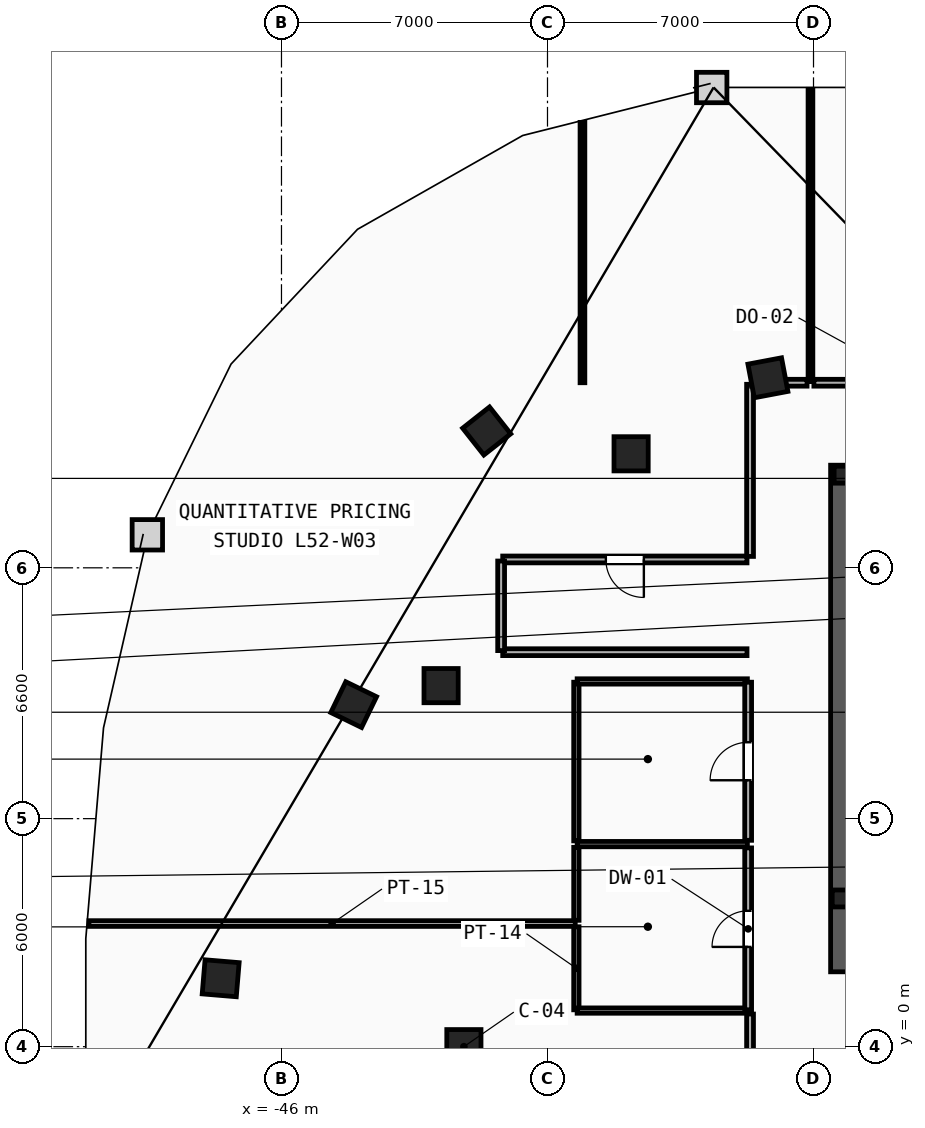
"""IFC4 building model, lengths in metres.
Left out: names, types, materials, properties, quantities, classifications, styles, units other than length and angle.
Written with IfcOpenShell. Run it as: python <this file> out.ifc"""

import sys

from ifc_helpers import new_model, si_unit, direction, frame, frame_2d, origin, origin_2d, place, context, subcontext, project, spatial, rectangle, i_section, extrude, element, fill, save


model = new_model("IFC4")
c1 = context("Model", 3, precision=1e-05, world=origin(), true_north=direction((0.0, 1.0)))
c2 = subcontext(c1, "Body", "Model", "MODEL_VIEW")
j1 = project(units=[si_unit("LENGTHUNIT", "METRE"), si_unit("PLANEANGLEUNIT", "RADIAN")], contexts=[c1])
p1 = place(None, origin())
s1 = spatial("IfcSite", under=j1, at=p1, CompositionType="ELEMENT")
p2 = place(p1, origin())
s2 = spatial("IfcBuilding", under=s1, at=p2, CompositionType="ELEMENT")
p3 = place(p2, frame((0.0, 0.0, 199.0)))
s3 = spatial("IfcBuildingStorey", under=s2, at=p3, CompositionType="ELEMENT", Elevation=199.0)
for number, where, z_axis, x_axis in (
    (1, (-31.3, 3.9, 0.0), (0.0, 0.0, 1.0), (1.0, 0.0, 0.0)),
    (2, (-31.25, 15.05, 0.0), (0.0, 0.0, 1.0), (1.0, 0.0, 0.0)),
):
    element("IfcColumn", number, at=place(p3, frame(where, z_axis=z_axis, x_axis=x_axis)), inside=s3, PredefinedType="COLUMN", context=c2, shape_type="SweptSolid", body=[
        extrude(i_section(OverallWidth=0.416, OverallDepth=0.446, WebThickness=0.039, FlangeThickness=0.063, FilletRadius=0.018, at=origin_2d()), origin(), (0.0, 0.0, 1.0), 3.6),
    ])
for number, where, z_axis, x_axis in (
    (3, (-41.2, 0.0, 0.0), (0.0, 0.0, 1.0), (1.0, 0.0, 0.0)),
    (4, (-41.8, 9.5, 0.0), (0.0, 0.0, 1.0), (1.0, 0.0, 0.0)),
    (5, (-36.8, 15.6, 0.0), (0.0, 0.0, 1.0), (1.0, 0.0, 0.0)),
    (6, (-33.2, 17.6, 0.0), (0.0, 0.0, 1.0), (-0.983, -0.186, 0.0)),
    (7, (-40.6, 16.2, 0.0), (0.0, 0.0, 1.0), (-0.785, -0.619, 0.0)),
    (8, (-44.1, 9.0, 0.0), (0.0, 0.0, 1.0), (-0.437, -0.899, 0.0)),
    (9, (-47.6, 1.8, 0.0), (0.0, 0.0, 1.0), (-0.084, -0.997, 0.0)),
):
    element("IfcColumn", number, at=place(p3, frame(where, z_axis=z_axis, x_axis=x_axis)), inside=s3, PredefinedType="COLUMN", context=c2, shape_type="SweptSolid", body=[
        extrude(rectangle(XDim=0.9, YDim=0.9, at=origin_2d()), origin(), (0.0, 0.0, 1.0), 3.6),
    ])
p4 = place(p3, frame((-31.225, 1.97, 0.0), z_axis=(0.0, 0.0, 1.0), x_axis=(0.0, 1.0, 0.0)))
e10 = element("IfcWall", 10, at=p4, inside=s3, PredefinedType="SHEAR", context=c2, shape_type="SweptSolid", body=[
    extrude(rectangle(XDim=13.33, YDim=0.65, at=frame_2d((6.665, 0.0))), origin(), (0.0, 0.0, 1.0), 3.34),
])
p5 = place(p3, frame((-31.2, 15.1, 0.0), z_axis=(0.0, 0.0, 1.0), x_axis=(1.0, 0.0, 0.0)))
e11 = element("IfcWall", 11, at=p5, inside=s3, PredefinedType="SHEAR", context=c2, shape_type="SweptSolid", body=[
    extrude(rectangle(XDim=2.5, YDim=0.3, at=frame_2d((1.25, 0.0))), origin(), (0.0, 0.0, 1.0), 3.34),
])
p6 = place(p3, frame((-38.24, 0.97, 0.0), z_axis=(0.0, 0.0, 1.0), x_axis=(0.0, 1.0, 0.0)))
e12 = element("IfcWall", 12, at=p6, inside=s3, PredefinedType="PARTITIONING", context=c2, shape_type="SweptSolid", body=[
    extrude(rectangle(XDim=2.185, YDim=0.14, at=frame_2d((1.093, 0.0))), origin(), (0.0, 0.0, 1.0), 3.34),
])
p7 = place(p3, frame((-38.24, 3.325, 0.0), z_axis=(0.0, 0.0, 1.0), x_axis=(0.0, 1.0, 0.0)))
e13 = element("IfcWall", 13, at=p7, inside=s3, PredefinedType="PARTITIONING", context=c2, shape_type="SweptSolid", body=[
    extrude(rectangle(XDim=1.92, YDim=0.14, at=frame_2d((0.96, 0.0))), origin(), (0.0, 0.0, 1.0), 3.34),
])
p8 = place(p3, frame((-38.24, 5.415, 0.0), z_axis=(0.0, 0.0, 1.0), x_axis=(0.0, 1.0, 0.0)))
e14 = element("IfcWall", 14, at=p8, inside=s3, PredefinedType="PARTITIONING", context=c2, shape_type="SweptSolid", body=[
    extrude(rectangle(XDim=4.175, YDim=0.14, at=frame_2d((2.087, 0.0))), origin(), (0.0, 0.0, 1.0), 3.34),
])
for number, where, z_axis, x_axis in (
    (15, (-38.22, 0.95, 0.0), (0.0, 0.0, 1.0), (1.0, 0.0, 0.0)),
    (16, (-38.22, 5.33, 0.0), (0.0, 0.0, 1.0), (1.0, 0.0, 0.0)),
    (17, (-38.22, 9.61, 0.0), (0.0, 0.0, 1.0), (1.0, 0.0, 0.0)),
):
    element("IfcWall", number, at=place(p3, frame(where, z_axis=z_axis, x_axis=x_axis)), inside=s3, PredefinedType="PARTITIONING", context=c2, shape_type="SweptSolid", body=[
        extrude(rectangle(XDim=4.48, YDim=0.14, at=frame_2d((2.24, 0.0))), origin(), (0.0, 0.0, 1.0), 3.34),
    ])
p9 = place(p3, frame((-33.72, 0.97, 0.0), z_axis=(0.0, 0.0, 1.0), x_axis=(0.0, 1.0, 0.0)))
e18 = element("IfcWall", 18, at=p9, inside=s3, PredefinedType="PARTITIONING", context=c2, shape_type="SweptSolid", body=[
    extrude(rectangle(XDim=4.26, YDim=0.18, at=frame_2d((2.13, 0.0))), origin(), (0.0, 0.0, 1.0), 3.34),
])
p10 = place(p9, frame((1.655, 0.0, 0.0)))
e19 = element("IfcOpeningElement", 19, at=p10, cuts=e18, PredefinedType="OPENING", context=c2, shape_type="SweptSolid", body=[
    extrude(rectangle(XDim=0.95, YDim=2.1, at=frame_2d((0.475, 1.05))), frame((0.0, 0.1, 0.0), z_axis=(0.0, -1.0, 0.0), x_axis=(1.0, 0.0, 0.0)), (0.0, 0.0, 1.0), 0.2),
])
p11 = place(p3, frame((-33.72, 5.43, 0.0), z_axis=(0.0, 0.0, 1.0), x_axis=(0.0, 1.0, 0.0)))
e20 = element("IfcWall", 20, at=p11, inside=s3, PredefinedType="PARTITIONING", context=c2, shape_type="SweptSolid", body=[
    extrude(rectangle(XDim=4.16, YDim=0.18, at=frame_2d((2.08, 0.0))), origin(), (0.0, 0.0, 1.0), 3.34),
])
p12 = place(p11, frame((1.58, 0.0, 0.0)))
e21 = element("IfcOpeningElement", 21, at=p12, cuts=e20, PredefinedType="OPENING", context=c2, shape_type="SweptSolid", body=[
    extrude(rectangle(XDim=1.0, YDim=2.15, at=frame_2d((0.5, 1.075))), frame((0.0, 0.1, 0.0), z_axis=(0.0, -1.0, 0.0), x_axis=(1.0, 0.0, 0.0)), (0.0, 0.0, 1.0), 0.2),
])
p13 = place(p3, frame((-51.066, 3.24, 0.0), z_axis=(0.0, 0.0, 1.0), x_axis=(1.0, 0.0, 0.0)))
e22 = element("IfcWall", 22, at=p13, inside=s3, PredefinedType="PARTITIONING", context=c2, shape_type="SweptSolid", body=[
    extrude(rectangle(XDim=12.796, YDim=0.15, at=frame_2d((6.398, 0.0))), origin(), (0.0, 0.0, 1.0), 3.34),
])
p14 = place(p3, frame((-38.08, 17.47, 0.0), z_axis=(0.0, 0.0, 1.0), x_axis=(0.0, 1.0, 0.0)))
e23 = element("IfcWall", 23, at=p14, inside=s3, PredefinedType="PARTITIONING", context=c2, shape_type="SweptSolid", body=[
    extrude(rectangle(XDim=6.85, YDim=0.125, at=frame_2d((3.425, 0.0))), origin(), (0.0, 0.0, 1.0), 3.34),
])
p15 = place(p3, frame((-32.08, 17.5, 0.0), z_axis=(0.0, 0.0, 1.0), x_axis=(0.0, 1.0, 0.0)))
e24 = element("IfcWall", 24, at=p15, inside=s3, PredefinedType="PARTITIONING", context=c2, shape_type="SweptSolid", body=[
    extrude(rectangle(XDim=7.69, YDim=0.125, at=frame_2d((3.845, 0.0))), origin(), (0.0, 0.0, 1.0), 3.34),
])
p16 = place(p3, frame((-33.67, 0.859, 0.0), z_axis=(0.0, 0.0, 1.0), x_axis=(0.0, -1.0, 0.0)))
e25 = element("IfcWall", 25, at=p16, inside=s3, PredefinedType="PARTITIONING", context=c2, shape_type="SweptSolid", body=[
    extrude(rectangle(XDim=1.187, YDim=0.18, at=frame_2d((0.594, 0.0))), origin(), (0.0, 0.0, 1.0), 3.34),
])
p17 = place(p3, frame((-33.75, 12.82, 0.0), z_axis=(0.0, 0.0, 1.0), x_axis=(-1.0, 0.0, 0.0)))
e26 = element("IfcWall", 26, at=p17, inside=s3, PredefinedType="PARTITIONING", context=c2, shape_type="SweptSolid", body=[
    extrude(rectangle(XDim=6.428, YDim=0.18, at=frame_2d((3.214, 0.0))), origin(), (0.0, 0.0, 1.0), 3.34),
])
p18 = place(p17, frame((2.714, 0.0, 0.0)))
e27 = element("IfcOpeningElement", 27, at=p18, cuts=e26, PredefinedType="OPENING", context=c2, shape_type="SweptSolid", body=[
    extrude(rectangle(XDim=1.0, YDim=2.15, at=frame_2d((0.5, 1.075))), frame((0.0, 0.1, 0.0), z_axis=(0.0, -1.0, 0.0), x_axis=(1.0, 0.0, 0.0)), (0.0, 0.0, 1.0), 0.2),
])
p19 = place(p3, frame((-40.178, 10.38, 0.0), z_axis=(0.0, 0.0, 1.0), x_axis=(1.0, 0.0, 0.0)))
e28 = element("IfcWall", 28, at=p19, inside=s3, PredefinedType="PARTITIONING", context=c2, shape_type="SweptSolid", body=[
    extrude(rectangle(XDim=6.428, YDim=0.18, at=frame_2d((3.214, 0.0))), origin(), (0.0, 0.0, 1.0), 3.34),
])
p20 = place(p3, frame((-33.67, 17.428, 0.0), z_axis=(0.0, 0.0, 1.0), x_axis=(0.0, -1.0, 0.0)))
e29 = element("IfcWall", 29, at=p20, inside=s3, PredefinedType="PARTITIONING", context=c2, shape_type="SweptSolid", body=[
    extrude(rectangle(XDim=4.529, YDim=0.18, at=frame_2d((2.264, 0.0))), origin(), (0.0, 0.0, 1.0), 3.34),
])
p21 = place(p3, frame((-40.22, 12.779, 0.0), z_axis=(0.0, 0.0, 1.0), x_axis=(0.0, -1.0, 0.0)))
e30 = element("IfcWall", 30, at=p21, inside=s3, PredefinedType="PARTITIONING", context=c2, shape_type="SweptSolid", body=[
    extrude(rectangle(XDim=2.357, YDim=0.18, at=frame_2d((1.179, 0.0))), origin(), (0.0, 0.0, 1.0), 3.34),
])
p22 = place(p3, frame((-32.17, 17.47, 0.0), z_axis=(0.0, 0.0, 1.0), x_axis=(-1.0, 0.0, 0.0)))
e31 = element("IfcWall", 31, at=p22, inside=s3, PredefinedType="PARTITIONING", context=c2, shape_type="SweptSolid", body=[
    extrude(rectangle(XDim=1.458, YDim=0.18, at=frame_2d((0.729, 0.0))), origin(), (0.0, 0.0, 1.0), 3.34),
])
p23 = place(p3, frame((-26.57, 17.47, 0.0), z_axis=(0.0, 0.0, 1.0), x_axis=(-1.0, 0.0, 0.0)))
e32 = element("IfcWall", 32, at=p23, inside=s3, PredefinedType="PARTITIONING", context=c2, shape_type="SweptSolid", body=[
    extrude(rectangle(XDim=5.42, YDim=0.18, at=frame_2d((2.71, 0.0))), origin(), (0.0, 0.0, 1.0), 3.34),
])
p24 = place(p23, frame((1.91, 0.0, 0.0)))
e33 = element("IfcOpeningElement", 33, at=p24, cuts=e32, PredefinedType="OPENING", context=c2, shape_type="SweptSolid", body=[
    extrude(rectangle(XDim=1.6, YDim=2.2, at=frame_2d((0.8, 1.1))), frame((0.0, 0.1, 0.0), z_axis=(0.0, -1.0, 0.0), x_axis=(1.0, 0.0, 0.0)), (0.0, 0.0, 1.0), 0.2),
])
p25 = place(p18, origin())
e34 = element("IfcDoor", 34, at=p25, inside=s3, OperationType="SINGLE_SWING_LEFT", PredefinedType="DOOR", context=c2, shape_type="SweptSolid", body=[
    extrude(rectangle(XDim=1.0, YDim=2.15, at=frame_2d((0.5, 1.075))), frame((0.0, 0.025, 0.0), z_axis=(0.0, -1.0, 0.0), x_axis=(1.0, 0.0, 0.0)), (0.0, 0.0, 1.0), 0.05),
])
fill(e27, e34)
p26 = place(p10, origin())
e35 = element("IfcDoor", 35, at=p26, inside=s3, OperationType="SINGLE_SWING_LEFT", PredefinedType="DOOR", context=c2, shape_type="SweptSolid", body=[
    extrude(rectangle(XDim=0.95, YDim=2.1, at=frame_2d((0.475, 1.05))), frame((0.0, 0.025, 0.0), z_axis=(0.0, -1.0, 0.0), x_axis=(1.0, 0.0, 0.0)), (0.0, 0.0, 1.0), 0.05),
])
fill(e19, e35)
p27 = place(p12, origin())
e36 = element("IfcDoor", 36, at=p27, inside=s3, OperationType="SINGLE_SWING_LEFT", PredefinedType="DOOR", context=c2, shape_type="SweptSolid", body=[
    extrude(rectangle(XDim=1.0, YDim=2.15, at=frame_2d((0.5, 1.075))), frame((0.0, 0.025, 0.0), z_axis=(0.0, -1.0, 0.0), x_axis=(1.0, 0.0, 0.0)), (0.0, 0.0, 1.0), 0.05),
])
fill(e21, e36)
save(model, sys.argv[1])
